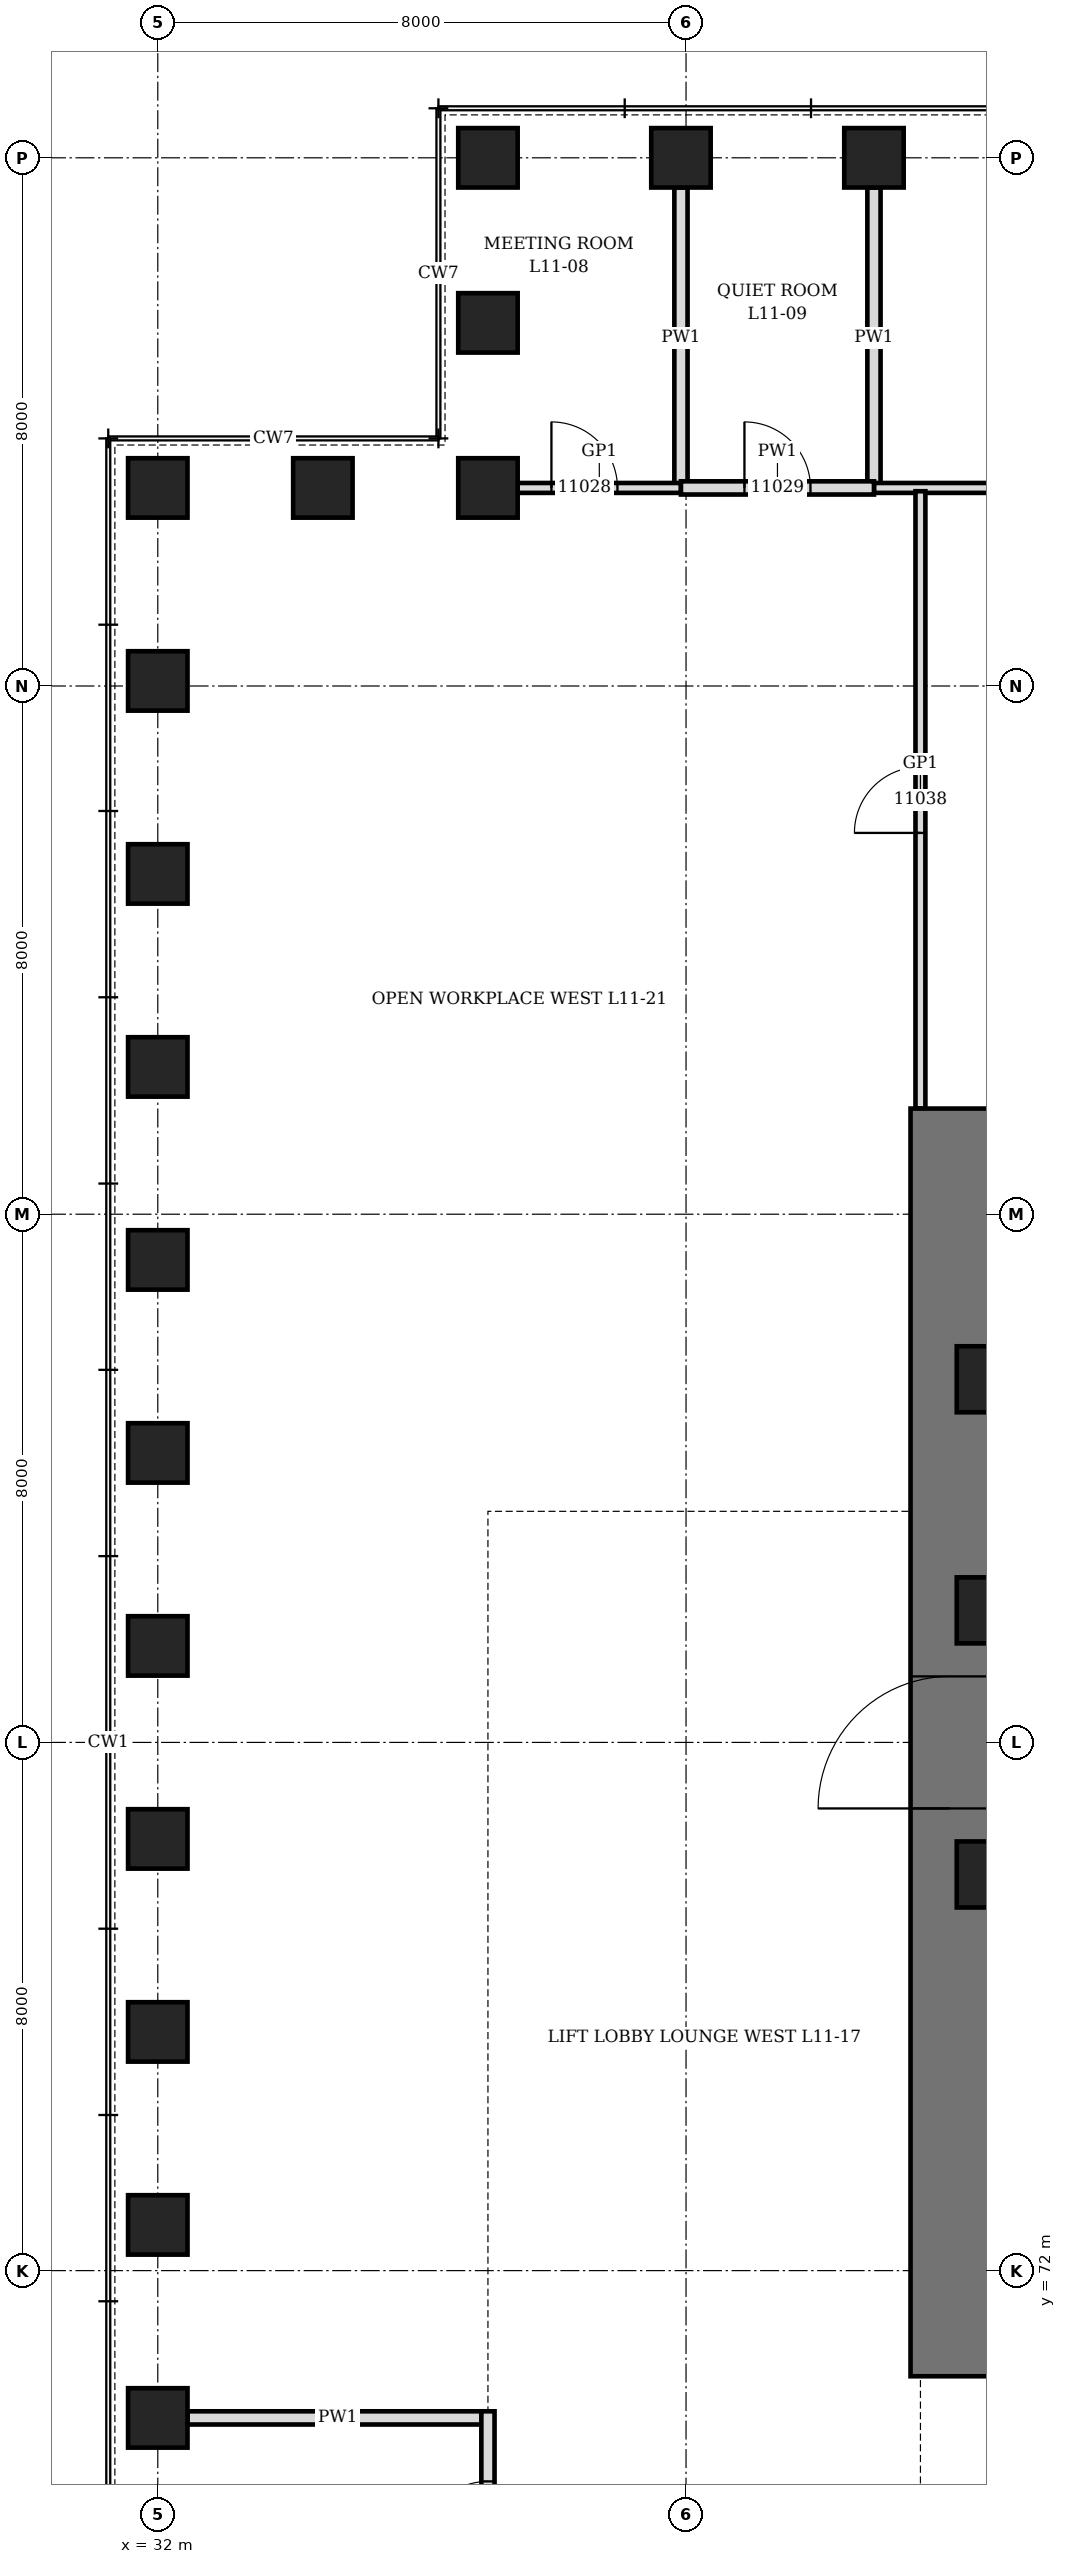
"""IFC4 building model, lengths in metres.
Left out: names, types, materials, properties, quantities, classifications, styles, units other than length and angle.
Written with IfcOpenShell. Run it as: python <this file> out.ifc"""

import sys

from ifc_helpers import new_model, si_unit, direction, frame, frame_2d, origin, origin_2d, place, context, subcontext, project, spatial, rectangle, hollow_rectangle, extrude, element, fill, save


model = new_model("IFC4")
c1 = context("Model", 3, precision=1e-05, world=origin(), true_north=direction((0.0, 1.0)))
c2 = subcontext(c1, "Body", "Model", "MODEL_VIEW")
j1 = project(units=[si_unit("LENGTHUNIT", "METRE"), si_unit("PLANEANGLEUNIT", "RADIAN")], contexts=[c1])
p1 = place(None, origin())
s1 = spatial("IfcSite", under=j1, at=p1, CompositionType="ELEMENT")
p2 = place(p1, origin())
s2 = spatial("IfcBuilding", under=s1, at=p2, CompositionType="ELEMENT")
p3 = place(p2, frame((0.0, 0.0, 55.9)))
s3 = spatial("IfcBuildingStorey", under=s2, at=p3, CompositionType="ELEMENT", Elevation=55.9)
for number, where, z_axis, x_axis in (
    (1, (42.846, 104.0, 0.0), (0.0, 0.0, 1.0), (1.0, 0.0, 0.0)),
    (2, (39.923, 104.0, 0.0), (0.0, 0.0, 1.0), (1.0, 0.0, 0.0)),
    (3, (37.0, 104.0, 0.0), (0.0, 0.0, 1.0), (0.0, 1.0, 0.0)),
    (4, (37.0, 101.5, 0.0), (0.0, 0.0, 1.0), (0.0, 1.0, 0.0)),
    (5, (37.0, 99.0, 0.0), (0.0, 0.0, 1.0), (1.0, 0.0, 0.0)),
    (6, (34.5, 99.0, 0.0), (0.0, 0.0, 1.0), (1.0, 0.0, 0.0)),
    (7, (32.0, 99.0, 0.0), (0.0, 0.0, 1.0), (0.0, 1.0, 0.0)),
    (8, (32.0, 96.077, 0.0), (0.0, 0.0, 1.0), (0.0, 1.0, 0.0)),
    (9, (32.0, 93.154, 0.0), (0.0, 0.0, 1.0), (0.0, 1.0, 0.0)),
    (10, (32.0, 90.231, 0.0), (0.0, 0.0, 1.0), (0.0, 1.0, 0.0)),
    (11, (32.0, 87.308, 0.0), (0.0, 0.0, 1.0), (0.0, 1.0, 0.0)),
    (12, (32.0, 84.385, 0.0), (0.0, 0.0, 1.0), (0.0, 1.0, 0.0)),
    (13, (32.0, 81.461, 0.0), (0.0, 0.0, 1.0), (0.0, 1.0, 0.0)),
    (14, (32.0, 78.539, 0.0), (0.0, 0.0, 1.0), (0.0, 1.0, 0.0)),
    (15, (32.0, 75.615, 0.0), (0.0, 0.0, 1.0), (0.0, 1.0, 0.0)),
    (16, (32.0, 72.692, 0.0), (0.0, 0.0, 1.0), (0.0, 1.0, 0.0)),
    (17, (32.0, 69.769, 0.0), (0.0, 0.0, 1.0), (0.0, 1.0, 0.0)),
):
    element("IfcColumn", number, at=place(p3, frame(where, z_axis=z_axis, x_axis=x_axis)), inside=s3, PredefinedType="COLUMN", context=c2, shape_type="SweptSolid", body=[
        extrude(hollow_rectangle(XDim=0.9, YDim=0.9, WallThickness=0.12, at=origin_2d()), origin(), (0.0, 0.0, 1.0), 4.2),
    ])
p4 = place(p3, frame((44.0, 70.4, 0.0), z_axis=(0.0, 0.0, 1.0), x_axis=(0.0, 1.0, 0.0)))
e18 = element("IfcWall", 18, at=p4, inside=s3, PredefinedType="SHEAR", context=c2, shape_type="SweptSolid", body=[
    extrude(rectangle(XDim=19.2, YDim=1.2, at=frame_2d((9.6, 0.0))), origin(), (0.0, 0.0, 1.0), 4.2),
])
p5 = place(p4, frame((8.6, 0.0, 0.0)))
e19 = element("IfcOpeningElement", 19, at=p5, cuts=e18, PredefinedType="OPENING", context=c2, shape_type="SweptSolid", body=[
    extrude(rectangle(XDim=2.0, YDim=2.4, at=frame_2d((1.0, 1.2))), frame((0.0, 0.61, 0.0), z_axis=(0.0, -1.0, 0.0), x_axis=(1.0, 0.0, 0.0)), (0.0, 0.0, 1.0), 1.22),
])
for number, where, z_axis, x_axis in (
    (20, (44.6, 78.0, 0.0), (0.0, 0.0, 1.0), (1.0, 0.0, 0.0)),
    (21, (44.6, 82.0, 0.0), (0.0, 0.0, 1.0), (1.0, 0.0, 0.0)),
    (22, (44.6, 85.5, 0.0), (0.0, 0.0, 1.0), (1.0, 0.0, 0.0)),
):
    element("IfcColumn", number, at=place(p3, frame(where, z_axis=z_axis, x_axis=x_axis)), inside=s3, PredefinedType="COLUMN", context=c2, shape_type="SweptSolid", body=[
        extrude(hollow_rectangle(XDim=1.0, YDim=1.0, WallThickness=0.15, at=origin_2d()), origin(), (0.0, 0.0, 1.0), 4.2),
    ])
p6 = place(p3, frame((39.923, 99.0, 0.0), z_axis=(0.0, 0.0, 1.0), x_axis=(0.0, 1.0, 0.0)))
e23 = element("IfcWall", 23, at=p6, inside=s3, PredefinedType="PARTITIONING", context=c2, shape_type="SweptSolid", body=[
    extrude(rectangle(XDim=4.55, YDim=0.2, at=frame_2d((2.275, 0.0))), origin(), (0.0, 0.0, 1.0), 3.428),
])
p7 = place(p3, frame((42.846, 99.0, 0.0), z_axis=(0.0, 0.0, 1.0), x_axis=(0.0, 1.0, 0.0)))
e24 = element("IfcWall", 24, at=p7, inside=s3, PredefinedType="PARTITIONING", context=c2, shape_type="SweptSolid", body=[
    extrude(rectangle(XDim=4.55, YDim=0.2, at=frame_2d((2.275, 0.0))), origin(), (0.0, 0.0, 1.0), 3.278),
])
p8 = place(p3, frame((32.45, 69.769, 0.0), z_axis=(0.0, 0.0, 1.0), x_axis=(1.0, 0.0, 0.0)))
e25 = element("IfcWall", 25, at=p8, inside=s3, PredefinedType="PARTITIONING", context=c2, shape_type="SweptSolid", body=[
    extrude(rectangle(XDim=4.55, YDim=0.2, at=frame_2d((2.275, 0.0))), origin(), (0.0, 0.0, 1.0), 3.428),
])
p9 = place(p3, frame((37.45, 99.0, 0.0), z_axis=(0.0, 0.0, 1.0), x_axis=(1.0, 0.0, 0.0)))
e26 = element("IfcWall", 26, at=p9, inside=s3, PredefinedType="PARTITIONING", context=c2, shape_type="SweptSolid", body=[
    extrude(rectangle(XDim=2.473, YDim=0.15, at=frame_2d((1.237, 0.0))), origin(), (0.0, 0.0, 1.0), 4.04),
])
p10 = place(p9, frame((0.511, 0.0, 0.0)))
e27 = element("IfcOpeningElement", 27, at=p10, cuts=e26, PredefinedType="OPENING", context=c2, shape_type="SweptSolid", body=[
    extrude(rectangle(XDim=1.0, YDim=2.4, at=frame_2d((0.5, 1.2))), frame((0.0, 0.085, 0.0), z_axis=(0.0, -1.0, 0.0), x_axis=(1.0, 0.0, 0.0)), (0.0, 0.0, 1.0), 0.17),
])
p11 = place(p3, frame((42.846, 99.0, 0.0), z_axis=(0.0, 0.0, 1.0), x_axis=(1.0, 0.0, 0.0)))
e28 = element("IfcWall", 28, at=p11, inside=s3, PredefinedType="PARTITIONING", context=c2, shape_type="SweptSolid", body=[
    extrude(rectangle(XDim=8.869, YDim=0.15, at=frame_2d((4.435, 0.0))), origin(), (0.0, 0.0, 1.0), 4.04),
])
p12 = place(p11, frame((3.885, 0.0, 0.0)))
e29 = element("IfcOpeningElement", 29, at=p12, cuts=e28, PredefinedType="OPENING", context=c2, shape_type="SweptSolid", body=[
    extrude(rectangle(XDim=1.0, YDim=2.4, at=frame_2d((0.5, 1.2))), frame((0.0, 0.085, 0.0), z_axis=(0.0, -1.0, 0.0), x_axis=(1.0, 0.0, 0.0)), (0.0, 0.0, 1.0), 0.17),
])
p13 = place(p3, frame((39.923, 99.0, 0.0), z_axis=(0.0, 0.0, 1.0), x_axis=(1.0, 0.0, 0.0)))
e30 = element("IfcWall", 30, at=p13, inside=s3, PredefinedType="PARTITIONING", context=c2, shape_type="SweptSolid", body=[
    extrude(rectangle(XDim=2.923, YDim=0.2, at=frame_2d((1.461, 0.0))), origin(), (0.0, 0.0, 1.0), 4.04),
])
p14 = place(p13, frame((0.961, 0.0, 0.0)))
e31 = element("IfcOpeningElement", 31, at=p14, cuts=e30, PredefinedType="OPENING", context=c2, shape_type="SweptSolid", body=[
    extrude(rectangle(XDim=1.0, YDim=2.1, at=frame_2d((0.5, 1.05))), frame((0.0, 0.11, 0.0), z_axis=(0.0, -1.0, 0.0), x_axis=(1.0, 0.0, 0.0)), (0.0, 0.0, 1.0), 0.22),
])
p15 = place(p3, frame((37.0, 61.45, 0.0), z_axis=(0.0, 0.0, 1.0), x_axis=(0.0, 1.0, 0.0)))
e32 = element("IfcWall", 32, at=p15, inside=s3, PredefinedType="PARTITIONING", context=c2, shape_type="SweptSolid", body=[
    extrude(rectangle(XDim=8.419, YDim=0.2, at=frame_2d((4.209, 0.0))), origin(), (0.0, 0.0, 1.0), 4.04),
])
p16 = place(p15, frame((0.511, 0.0, 0.0)))
e33 = element("IfcOpeningElement", 33, at=p16, cuts=e32, PredefinedType="OPENING", context=c2, shape_type="SweptSolid", body=[
    extrude(rectangle(XDim=1.0, YDim=2.1, at=frame_2d((0.5, 1.05))), frame((0.0, 0.11, 0.0), z_axis=(0.0, -1.0, 0.0), x_axis=(1.0, 0.0, 0.0)), (0.0, 0.0, 1.0), 0.22),
])
p17 = place(p15, frame((3.435, 0.0, 0.0)))
e34 = element("IfcOpeningElement", 34, at=p17, cuts=e32, PredefinedType="OPENING", context=c2, shape_type="SweptSolid", body=[
    extrude(rectangle(XDim=1.0, YDim=2.1, at=frame_2d((0.5, 1.05))), frame((0.0, 0.11, 0.0), z_axis=(0.0, -1.0, 0.0), x_axis=(1.0, 0.0, 0.0)), (0.0, 0.0, 1.0), 0.22),
])
p18 = place(p15, frame((6.358, 0.0, 0.0)))
e35 = element("IfcOpeningElement", 35, at=p18, cuts=e32, PredefinedType="OPENING", context=c2, shape_type="SweptSolid", body=[
    extrude(rectangle(XDim=1.0, YDim=2.1, at=frame_2d((0.5, 1.05))), frame((0.0, 0.11, 0.0), z_axis=(0.0, -1.0, 0.0), x_axis=(1.0, 0.0, 0.0)), (0.0, 0.0, 1.0), 0.22),
])
p19 = place(p3, frame((43.55, 89.6, 0.0), z_axis=(0.0, 0.0, 1.0), x_axis=(0.0, 1.0, 0.0)))
e36 = element("IfcWall", 36, at=p19, inside=s3, PredefinedType="PARTITIONING", context=c2, shape_type="SweptSolid", body=[
    extrude(rectangle(XDim=9.35, YDim=0.15, at=frame_2d((4.675, 0.0))), origin(), (0.0, 0.0, 1.0), 4.04),
])
p20 = place(p19, frame((4.175, 0.0, 0.0)))
e37 = element("IfcOpeningElement", 37, at=p20, cuts=e36, PredefinedType="OPENING", context=c2, shape_type="SweptSolid", body=[
    extrude(rectangle(XDim=1.0, YDim=2.4, at=frame_2d((0.5, 1.2))), frame((0.0, 0.085, 0.0), z_axis=(0.0, -1.0, 0.0), x_axis=(1.0, 0.0, 0.0)), (0.0, 0.0, 1.0), 0.17),
])
p21 = place(p5, origin())
e38 = element("IfcDoor", 38, at=p21, inside=s3, OperationType="DOUBLE_DOOR_SINGLE_SWING", PredefinedType="DOOR", context=c2, shape_type="SweptSolid", body=[
    extrude(rectangle(XDim=2.0, YDim=2.4, at=frame_2d((1.0, 1.2))), frame((0.0, 0.35, 0.0), z_axis=(0.0, -1.0, 0.0), x_axis=(1.0, 0.0, 0.0)), (0.0, 0.0, 1.0), 0.7),
])
fill(e19, e38)
p22 = place(p10, origin())
e39 = element("IfcDoor", 39, at=p22, inside=s3, OperationType="SINGLE_SWING_RIGHT", PredefinedType="DOOR", context=c2, shape_type="SweptSolid", body=[
    extrude(rectangle(XDim=1.0, YDim=2.4, at=frame_2d((0.5, 1.2))), frame((0.0, 0.075, 0.0), z_axis=(0.0, -1.0, 0.0), x_axis=(1.0, 0.0, 0.0)), (0.0, 0.0, 1.0), 0.149),
])
fill(e27, e39)
p23 = place(p14, origin())
e40 = element("IfcDoor", 40, at=p23, inside=s3, OperationType="SINGLE_SWING_LEFT", PredefinedType="DOOR", context=c2, shape_type="SweptSolid", body=[
    extrude(rectangle(XDim=1.0, YDim=2.1, at=frame_2d((0.5, 1.05))), frame((0.0, 0.1, 0.0), z_axis=(0.0, -1.0, 0.0), x_axis=(1.0, 0.0, 0.0)), (0.0, 0.0, 1.0), 0.199),
])
fill(e31, e40)
p24 = place(p18, origin())
e41 = element("IfcDoor", 41, at=p24, inside=s3, OperationType="SINGLE_SWING_LEFT", PredefinedType="DOOR", context=c2, shape_type="SweptSolid", body=[
    extrude(rectangle(XDim=1.0, YDim=2.1, at=frame_2d((0.5, 1.05))), frame((0.0, 0.1, 0.0), z_axis=(0.0, -1.0, 0.0), x_axis=(1.0, 0.0, 0.0)), (0.0, 0.0, 1.0), 0.199),
])
fill(e35, e41)
p25 = place(p20, origin())
e42 = element("IfcDoor", 42, at=p25, inside=s3, OperationType="SINGLE_SWING_RIGHT", PredefinedType="DOOR", context=c2, shape_type="SweptSolid", body=[
    extrude(rectangle(XDim=1.0, YDim=2.4, at=frame_2d((0.5, 1.2))), frame((0.0, 0.075, 0.0), z_axis=(0.0, -1.0, 0.0), x_axis=(1.0, 0.0, 0.0)), (0.0, 0.0, 1.0), 0.149),
])
fill(e37, e42)
save(model, sys.argv[1])
